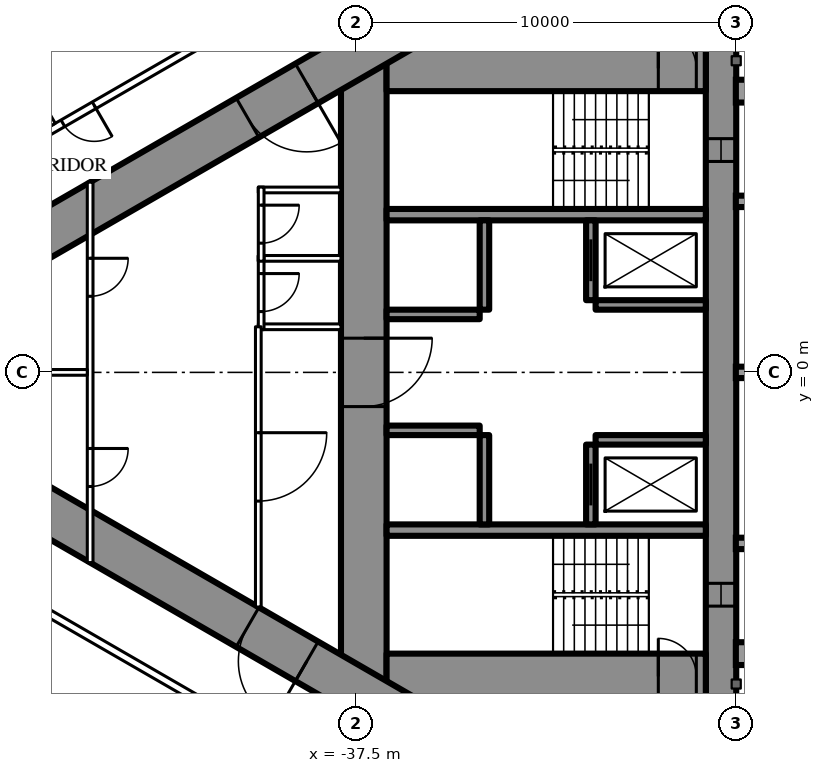
"""IFC4 building model, lengths in metres.
Left out: names, types, materials, properties, quantities, classifications, styles, units other than length and angle.
Written with IfcOpenShell. Run it as: python <this file> out.ifc"""

import sys

from ifc_helpers import new_model, si_unit, direction, frame, frame_2d, origin, place, context, subcontext, project, spatial, rectangle, extrude, element, fill, save


model = new_model("IFC4")
c1 = context("Model", 3, precision=1e-05, world=origin(), true_north=direction((0.0, 1.0)))
c2 = subcontext(c1, "Body", "Model", "MODEL_VIEW")
j1 = project(units=[si_unit("LENGTHUNIT", "METRE"), si_unit("PLANEANGLEUNIT", "RADIAN")], contexts=[c1])
p1 = place(None, origin())
s1 = spatial("IfcSite", under=j1, at=p1, CompositionType="ELEMENT")
p2 = place(p1, origin())
s2 = spatial("IfcBuilding", under=s1, at=p2, CompositionType="ELEMENT")
p3 = place(p2, frame((0.0, 0.0, 21.5)))
s3 = spatial("IfcBuildingStorey", under=s2, at=p3, CompositionType="ELEMENT", Elevation=21.5)
p4 = place(p3, frame((-27.9, 8.6, 0.0), z_axis=(0.0, 0.0, 1.0), x_axis=(0.0, -1.0, 0.0)))
e1 = element("IfcWall", 1, at=p4, inside=s3, PredefinedType="SHEAR", context=c2, shape_type="SweptSolid", body=[
    extrude(rectangle(XDim=17.2, YDim=0.8, at=frame_2d((8.6, 0.0))), origin(), (0.0, 0.0, 1.0), 3.5),
])
p5 = place(p4, frame((2.45, 0.0, 0.6)))
e2 = element("IfcOpeningElement", 2, at=p5, cuts=e1, PredefinedType="OPENING", context=c2, shape_type="SweptSolid", body=[
    extrude(rectangle(XDim=0.6, YDim=2.1, at=frame_2d((0.3, 1.05))), frame((0.0, 0.41, 0.0), z_axis=(0.0, -1.0, 0.0), x_axis=(1.0, 0.0, 0.0)), (0.0, 0.0, 1.0), 0.82),
])
p6 = place(p4, frame((14.15, 0.0, 0.6)))
e3 = element("IfcOpeningElement", 3, at=p6, cuts=e1, PredefinedType="OPENING", context=c2, shape_type="SweptSolid", body=[
    extrude(rectangle(XDim=0.6, YDim=2.1, at=frame_2d((0.3, 1.05))), frame((0.0, 0.41, 0.0), z_axis=(0.0, -1.0, 0.0), x_axis=(1.0, 0.0, 0.0)), (0.0, 0.0, 1.0), 0.82),
])
p7 = place(p3, frame((-37.3, 8.6, 0.0), z_axis=(0.0, 0.0, 1.0), x_axis=(0.0, -1.0, 0.0)))
e4 = element("IfcWall", 4, at=p7, inside=s3, PredefinedType="SHEAR", context=c2, shape_type="SweptSolid", body=[
    extrude(rectangle(XDim=17.2, YDim=1.2, at=frame_2d((8.6, 0.0))), origin(), (0.0, 0.0, 1.0), 3.5),
])
p8 = place(p7, frame((7.7, 0.0, 0.0)))
e5 = element("IfcOpeningElement", 5, at=p8, cuts=e4, PredefinedType="OPENING", context=c2, shape_type="SweptSolid", body=[
    extrude(rectangle(XDim=1.8, YDim=2.2, at=frame_2d((0.9, 1.1))), frame((0.0, 0.61, 0.0), z_axis=(0.0, -1.0, 0.0), x_axis=(1.0, 0.0, 0.0)), (0.0, 0.0, 1.0), 1.22),
])
p9 = place(p3, frame((-28.3, 8.0, 0.0), z_axis=(0.0, 0.0, 1.0), x_axis=(-1.0, 0.0, 0.0)))
e6 = element("IfcWall", 6, at=p9, inside=s3, PredefinedType="SHEAR", context=c2, shape_type="SweptSolid", body=[
    extrude(rectangle(XDim=8.4, YDim=1.2, at=frame_2d((4.2, 0.0))), origin(), (0.0, 0.0, 1.0), 3.5),
])
p10 = place(p9, frame((0.25, 0.0, 0.0)))
e7 = element("IfcOpeningElement", 7, at=p10, cuts=e6, PredefinedType="OPENING", context=c2, shape_type="SweptSolid", body=[
    extrude(rectangle(XDim=1.0, YDim=2.2, at=frame_2d((0.5, 1.1))), frame((0.0, 0.61, 0.0), z_axis=(0.0, -1.0, 0.0), x_axis=(1.0, 0.0, 0.0)), (0.0, 0.0, 1.0), 1.22),
])
p11 = place(p3, frame((-28.3, -8.0, 0.0), z_axis=(0.0, 0.0, 1.0), x_axis=(-1.0, 0.0, 0.0)))
e8 = element("IfcWall", 8, at=p11, inside=s3, PredefinedType="SHEAR", context=c2, shape_type="SweptSolid", body=[
    extrude(rectangle(XDim=8.4, YDim=1.2, at=frame_2d((4.2, 0.0))), origin(), (0.0, 0.0, 1.0), 3.5),
])
p12 = place(p11, frame((0.25, 0.0, 0.0)))
e9 = element("IfcOpeningElement", 9, at=p12, cuts=e8, PredefinedType="OPENING", context=c2, shape_type="SweptSolid", body=[
    extrude(rectangle(XDim=1.0, YDim=2.2, at=frame_2d((0.5, 1.1))), frame((0.0, 0.61, 0.0), z_axis=(0.0, -1.0, 0.0), x_axis=(1.0, 0.0, 0.0)), (0.0, 0.0, 1.0), 1.22),
])
for number, where, z_axis, x_axis in (
    (10, (-28.3, 4.15, 0.0), (0.0, 0.0, 1.0), (-1.0, 0.0, 0.0)),
    (11, (-28.3, -4.15, 0.0), (0.0, 0.0, 1.0), (-1.0, 0.0, 0.0)),
):
    element("IfcWall", number, at=place(p3, frame(where, z_axis=z_axis, x_axis=x_axis)), inside=s3, PredefinedType="SHEAR", context=c2, shape_type="SweptSolid", body=[
        extrude(rectangle(XDim=8.4, YDim=0.3, at=frame_2d((4.2, 0.0))), origin(), (0.0, 0.0, 1.0), 3.5),
    ])
p13 = place(p3, frame((-31.325, 4.0, 0.0), z_axis=(0.0, 0.0, 1.0), x_axis=(0.0, -1.0, 0.0)))
e12 = element("IfcWall", 12, at=p13, inside=s3, PredefinedType="SHEAR", context=c2, shape_type="SweptSolid", body=[
    extrude(rectangle(XDim=2.1, YDim=0.25, at=frame_2d((1.05, 0.0))), origin(), (0.0, 0.0, 1.0), 3.5),
])
p14 = place(p13, frame((0.5, 0.0, 0.0)))
e13 = element("IfcOpeningElement", 13, at=p14, cuts=e12, PredefinedType="OPENING", context=c2, shape_type="SweptSolid", body=[
    extrude(rectangle(XDim=1.1, YDim=2.2, at=frame_2d((0.55, 1.1))), frame((0.0, 0.135, 0.0), z_axis=(0.0, -1.0, 0.0), x_axis=(1.0, 0.0, 0.0)), (0.0, 0.0, 1.0), 0.27),
])
p15 = place(p3, frame((-34.125, 4.0, 0.0), z_axis=(0.0, 0.0, 1.0), x_axis=(0.0, -1.0, 0.0)))
e14 = element("IfcWall", 14, at=p15, inside=s3, PredefinedType="SHEAR", context=c2, shape_type="SweptSolid", body=[
    extrude(rectangle(XDim=2.35, YDim=0.25, at=frame_2d((1.175, 0.0))), origin(), (0.0, 0.0, 1.0), 3.5),
])
p16 = place(p3, frame((-28.3, 1.775, 0.0), z_axis=(0.0, 0.0, 1.0), x_axis=(-1.0, 0.0, 0.0)))
e15 = element("IfcWall", 15, at=p16, inside=s3, PredefinedType="SHEAR", context=c2, shape_type="SweptSolid", body=[
    extrude(rectangle(XDim=2.9, YDim=0.25, at=frame_2d((1.45, 0.0))), origin(), (0.0, 0.0, 1.0), 3.5),
])
p17 = place(p3, frame((-34.25, 1.525, 0.0), z_axis=(0.0, 0.0, 1.0), x_axis=(-1.0, 0.0, 0.0)))
e16 = element("IfcWall", 16, at=p17, inside=s3, PredefinedType="SHEAR", context=c2, shape_type="SweptSolid", body=[
    extrude(rectangle(XDim=2.45, YDim=0.25, at=frame_2d((1.225, 0.0))), origin(), (0.0, 0.0, 1.0), 3.5),
])
p18 = place(p3, frame((-31.325, -1.9, 0.0), z_axis=(0.0, 0.0, 1.0), x_axis=(0.0, -1.0, 0.0)))
e17 = element("IfcWall", 17, at=p18, inside=s3, PredefinedType="SHEAR", context=c2, shape_type="SweptSolid", body=[
    extrude(rectangle(XDim=2.1, YDim=0.25, at=frame_2d((1.05, 0.0))), origin(), (0.0, 0.0, 1.0), 3.5),
])
p19 = place(p18, frame((0.5, 0.0, 0.0)))
e18 = element("IfcOpeningElement", 18, at=p19, cuts=e17, PredefinedType="OPENING", context=c2, shape_type="SweptSolid", body=[
    extrude(rectangle(XDim=1.1, YDim=2.2, at=frame_2d((0.55, 1.1))), frame((0.0, 0.135, 0.0), z_axis=(0.0, -1.0, 0.0), x_axis=(1.0, 0.0, 0.0)), (0.0, 0.0, 1.0), 0.27),
])
p20 = place(p3, frame((-34.125, -1.65, 0.0), z_axis=(0.0, 0.0, 1.0), x_axis=(0.0, -1.0, 0.0)))
e19 = element("IfcWall", 19, at=p20, inside=s3, PredefinedType="SHEAR", context=c2, shape_type="SweptSolid", body=[
    extrude(rectangle(XDim=2.35, YDim=0.25, at=frame_2d((1.175, 0.0))), origin(), (0.0, 0.0, 1.0), 3.5),
])
p21 = place(p3, frame((-28.3, -1.775, 0.0), z_axis=(0.0, 0.0, 1.0), x_axis=(-1.0, 0.0, 0.0)))
e20 = element("IfcWall", 20, at=p21, inside=s3, PredefinedType="SHEAR", context=c2, shape_type="SweptSolid", body=[
    extrude(rectangle(XDim=2.9, YDim=0.25, at=frame_2d((1.45, 0.0))), origin(), (0.0, 0.0, 1.0), 3.5),
])
p22 = place(p3, frame((-34.25, -1.525, 0.0), z_axis=(0.0, 0.0, 1.0), x_axis=(-1.0, 0.0, 0.0)))
e21 = element("IfcWall", 21, at=p22, inside=s3, PredefinedType="SHEAR", context=c2, shape_type="SweptSolid", body=[
    extrude(rectangle(XDim=2.45, YDim=0.25, at=frame_2d((1.225, 0.0))), origin(), (0.0, 0.0, 1.0), 3.5),
])
p23 = place(p3, frame((-27.2, 14.3, 0.0), z_axis=(0.0, 0.0, 1.0), x_axis=(-0.866026593062, -0.499997940104, 0.0)))
e22 = element("IfcWall", 22, at=p23, inside=s3, PredefinedType="SHEAR", context=c2, shape_type="SweptSolid", body=[
    extrude(rectangle(XDim=28.946, YDim=1.2, at=frame_2d((14.473, 0.0))), origin(), (0.0, 0.0, 1.0), 3.5),
])
p24 = place(p23, frame((4.6, 0.0, 0.0)))
e23 = element("IfcOpeningElement", 23, at=p24, cuts=e22, PredefinedType="OPENING", context=c2, shape_type="SweptSolid", body=[
    extrude(rectangle(XDim=1.0, YDim=2.2, at=frame_2d((0.5, 1.1))), frame((0.0, 0.61, 0.0), z_axis=(0.0, -1.0, 0.0), x_axis=(1.0, 0.0, 0.0)), (0.0, 0.0, 1.0), 1.22),
])
p25 = place(p23, frame((13.395, 0.0, 0.0)))
e24 = element("IfcOpeningElement", 24, at=p25, cuts=e22, PredefinedType="OPENING", context=c2, shape_type="SweptSolid", body=[
    extrude(rectangle(XDim=1.8, YDim=2.2, at=frame_2d((0.9, 1.1))), frame((0.0, 0.61, 0.0), z_axis=(0.0, -1.0, 0.0), x_axis=(1.0, 0.0, 0.0)), (0.0, 0.0, 1.0), 1.22),
])
p26 = place(p3, frame((-27.2, -14.3, 0.0), z_axis=(0.0, 0.0, 1.0), x_axis=(-0.866024021859, 0.500002393557, 0.0)))
e25 = element("IfcWall", 25, at=p26, inside=s3, PredefinedType="SHEAR", context=c2, shape_type="SweptSolid", body=[
    extrude(rectangle(XDim=27.907, YDim=1.2, at=frame_2d((13.954, 0.0))), origin(), (0.0, 0.0, 1.0), 3.5),
])
p27 = place(p26, frame((4.6, 0.0, 0.0)))
e26 = element("IfcOpeningElement", 26, at=p27, cuts=e25, PredefinedType="OPENING", context=c2, shape_type="SweptSolid", body=[
    extrude(rectangle(XDim=1.0, YDim=2.2, at=frame_2d((0.5, 1.1))), frame((0.0, 0.61, 0.0), z_axis=(0.0, -1.0, 0.0), x_axis=(1.0, 0.0, 0.0)), (0.0, 0.0, 1.0), 1.22),
])
p28 = place(p26, frame((13.395, 0.0, 0.0)))
e27 = element("IfcOpeningElement", 27, at=p28, cuts=e25, PredefinedType="OPENING", context=c2, shape_type="SweptSolid", body=[
    extrude(rectangle(XDim=1.8, YDim=2.2, at=frame_2d((0.9, 1.1))), frame((0.0, 0.61, 0.0), z_axis=(0.0, -1.0, 0.0), x_axis=(1.0, 0.0, 0.0)), (0.0, 0.0, 1.0), 1.22),
])
p29 = place(p3, frame((-37.7, 10.894, 0.0), z_axis=(0.0, 0.0, 1.0), x_axis=(-0.866027905338, -0.499995667157, 0.0)))
e28 = element("IfcWall", 28, at=p29, inside=s3, PredefinedType="PARTITIONING", context=c2, shape_type="SweptSolid", body=[
    extrude(rectangle(XDim=21.787, YDim=0.2, at=frame_2d((10.894, 0.0))), origin(), (0.0, 0.0, 1.0), 3.25),
])
p30 = place(p29, frame((11.78, 0.0, 0.0)))
e29 = element("IfcOpeningElement", 29, at=p30, cuts=e28, PredefinedType="OPENING", context=c2, shape_type="SweptSolid", body=[
    extrude(rectangle(XDim=0.95, YDim=2.2, at=frame_2d((0.475, 1.1))), frame((0.0, 0.11, 0.0), z_axis=(0.0, -1.0, 0.0), x_axis=(1.0, 0.0, 0.0)), (0.0, 0.0, 1.0), 0.22),
])
p31 = place(p29, frame((7.73, 0.0, 0.0)))
e30 = element("IfcOpeningElement", 30, at=p31, cuts=e28, PredefinedType="OPENING", context=c2, shape_type="SweptSolid", body=[
    extrude(rectangle(XDim=0.95, YDim=2.2, at=frame_2d((0.475, 1.1))), frame((0.0, 0.11, 0.0), z_axis=(0.0, -1.0, 0.0), x_axis=(1.0, 0.0, 0.0)), (0.0, 0.0, 1.0), 0.22),
])
p32 = place(p3, frame((-36.92, -11.344, 0.0), z_axis=(0.0, 0.0, 1.0), x_axis=(-0.866028313256, 0.499994960614, 0.0)))
e31 = element("IfcWall", 31, at=p32, inside=s3, PredefinedType="PARTITIONING", context=c2, shape_type="SweptSolid", body=[
    extrude(rectangle(XDim=22.568, YDim=0.2, at=frame_2d((11.284, 0.0))), origin(), (0.0, 0.0, 1.0), 3.25),
])
p33 = place(p32, frame((15.03, 0.0, 0.0)))
e32 = element("IfcOpeningElement", 32, at=p33, cuts=e31, PredefinedType="OPENING", context=c2, shape_type="SweptSolid", body=[
    extrude(rectangle(XDim=0.95, YDim=2.2, at=frame_2d((0.475, 1.1))), frame((0.0, 0.11, 0.0), z_axis=(0.0, -1.0, 0.0), x_axis=(1.0, 0.0, 0.0)), (0.0, 0.0, 1.0), 0.22),
])
p34 = place(p32, frame((3.35, 0.0, 0.0)))
e33 = element("IfcOpeningElement", 33, at=p34, cuts=e31, PredefinedType="OPENING", context=c2, shape_type="SweptSolid", body=[
    extrude(rectangle(XDim=1.0, YDim=2.2, at=frame_2d((0.5, 1.1))), frame((0.0, 0.11, 0.0), z_axis=(0.0, -1.0, 0.0), x_axis=(1.0, 0.0, 0.0)), (0.0, 0.0, 1.0), 0.22),
])
p35 = place(p3, frame((-45.483, 6.515, 0.0), z_axis=(0.0, 0.0, 1.0), x_axis=(-0.500006934395, 0.866021400173, 0.0)))
e34 = element("IfcWall", 34, at=p35, inside=s3, PredefinedType="PARTITIONING", context=c2, shape_type="SweptSolid", body=[
    extrude(rectangle(XDim=2.6, YDim=0.15, at=frame_2d((1.3, 0.0))), origin(), (0.0, 0.0, 1.0), 3.25),
])
p36 = place(p35, frame((0.9, 0.0, 0.0)))
e35 = element("IfcOpeningElement", 35, at=p36, cuts=e34, PredefinedType="OPENING", context=c2, shape_type="SweptSolid", body=[
    extrude(rectangle(XDim=0.8, YDim=2.2, at=frame_2d((0.4, 1.1))), frame((0.0, 0.085, 0.0), z_axis=(0.0, -1.0, 0.0), x_axis=(1.0, 0.0, 0.0)), (0.0, 0.0, 1.0), 0.17),
])
for number, where, z_axis, x_axis in (
    (36, (-37.9, 1.2, 0.0), (0.0, 0.0, 1.0), (-1.0, 0.0, 0.0)),
    (37, (-37.9, 3.0, 0.0), (0.0, 0.0, 1.0), (-1.0, 0.0, 0.0)),
    (38, (-37.9, 4.8, 0.0), (0.0, 0.0, 1.0), (-1.0, 0.0, 0.0)),
):
    element("IfcWall", number, at=place(p3, frame(where, z_axis=z_axis, x_axis=x_axis)), inside=s3, PredefinedType="PARTITIONING", context=c2, shape_type="SweptSolid", body=[
        extrude(rectangle(XDim=2.175, YDim=0.15, at=frame_2d((1.087, 0.0))), origin(), (0.0, 0.0, 1.0), 3.25),
    ])
p37 = place(p3, frame((-40.0, 3.075, 0.0), z_axis=(0.0, 0.0, 1.0), x_axis=(0.0, -1.0, 0.0)))
e39 = element("IfcWall", 39, at=p37, inside=s3, PredefinedType="PARTITIONING", context=c2, shape_type="SweptSolid", body=[
    extrude(rectangle(XDim=1.95, YDim=0.15, at=frame_2d((0.975, 0.0))), origin(), (0.0, 0.0, 1.0), 3.25),
])
p38 = place(p37, frame((0.475, 0.0, 0.0)))
e40 = element("IfcOpeningElement", 40, at=p38, cuts=e39, PredefinedType="OPENING", context=c2, shape_type="SweptSolid", body=[
    extrude(rectangle(XDim=1.0, YDim=2.2, at=frame_2d((0.5, 1.1))), frame((0.0, 0.085, 0.0), z_axis=(0.0, -1.0, 0.0), x_axis=(1.0, 0.0, 0.0)), (0.0, 0.0, 1.0), 0.17),
])
p39 = place(p3, frame((-40.0, 4.875, 0.0), z_axis=(0.0, 0.0, 1.0), x_axis=(0.0, -1.0, 0.0)))
e41 = element("IfcWall", 41, at=p39, inside=s3, PredefinedType="PARTITIONING", context=c2, shape_type="SweptSolid", body=[
    extrude(rectangle(XDim=1.95, YDim=0.15, at=frame_2d((0.975, 0.0))), origin(), (0.0, 0.0, 1.0), 3.25),
])
p40 = place(p39, frame((0.475, 0.0, 0.0)))
e42 = element("IfcOpeningElement", 42, at=p40, cuts=e41, PredefinedType="OPENING", context=c2, shape_type="SweptSolid", body=[
    extrude(rectangle(XDim=1.0, YDim=2.2, at=frame_2d((0.5, 1.1))), frame((0.0, 0.085, 0.0), z_axis=(0.0, -1.0, 0.0), x_axis=(1.0, 0.0, 0.0)), (0.0, 0.0, 1.0), 0.17),
])
p41 = place(p3, frame((-40.075, 1.2, 0.0), z_axis=(0.0, 0.0, 1.0), x_axis=(0.0, -1.0, 0.0)))
e43 = element("IfcWall", 43, at=p41, inside=s3, PredefinedType="PARTITIONING", context=c2, shape_type="SweptSolid", body=[
    extrude(rectangle(XDim=7.374, YDim=0.15, at=frame_2d((3.687, 0.0))), origin(), (0.0, 0.0, 1.0), 3.25),
])
p42 = place(p41, frame((2.787, 0.0, 0.0)))
e44 = element("IfcOpeningElement", 44, at=p42, cuts=e43, PredefinedType="OPENING", context=c2, shape_type="SweptSolid", body=[
    extrude(rectangle(XDim=1.8, YDim=2.2, at=frame_2d((0.9, 1.1))), frame((0.0, 0.085, 0.0), z_axis=(0.0, -1.0, 0.0), x_axis=(1.0, 0.0, 0.0)), (0.0, 0.0, 1.0), 0.17),
])
p43 = place(p3, frame((-44.5, 5.005, 0.0), z_axis=(0.0, 0.0, 1.0), x_axis=(0.0, -1.0, 0.0)))
e45 = element("IfcWall", 45, at=p43, inside=s3, PredefinedType="PARTITIONING", context=c2, shape_type="SweptSolid", body=[
    extrude(rectangle(XDim=10.009, YDim=0.15, at=frame_2d((5.005, 0.0))), origin(), (0.0, 0.0, 1.0), 2.45),
])
p44 = place(p43, frame((2.002, 0.0, 0.0)))
e46 = element("IfcOpeningElement", 46, at=p44, cuts=e45, PredefinedType="OPENING", context=c2, shape_type="SweptSolid", body=[
    extrude(rectangle(XDim=1.0, YDim=2.2, at=frame_2d((0.5, 1.1))), frame((0.0, 0.085, 0.0), z_axis=(0.0, -1.0, 0.0), x_axis=(1.0, 0.0, 0.0)), (0.0, 0.0, 1.0), 0.17),
])
p45 = place(p43, frame((7.007, 0.0, 0.0)))
e47 = element("IfcOpeningElement", 47, at=p45, cuts=e45, PredefinedType="OPENING", context=c2, shape_type="SweptSolid", body=[
    extrude(rectangle(XDim=1.0, YDim=2.2, at=frame_2d((0.5, 1.1))), frame((0.0, 0.085, 0.0), z_axis=(0.0, -1.0, 0.0), x_axis=(1.0, 0.0, 0.0)), (0.0, 0.0, 1.0), 0.17),
])
p46 = place(p3, frame((-44.575, 0.0, 0.0), z_axis=(0.0, 0.0, 1.0), x_axis=(-1.0, 0.0, 0.0)))
e48 = element("IfcWall", 48, at=p46, inside=s3, PredefinedType="PARTITIONING", context=c2, shape_type="SweptSolid", body=[
    extrude(rectangle(XDim=8.593, YDim=0.15, at=frame_2d((4.297, 0.0))), origin(), (0.0, 0.0, 1.0), 2.25),
])
p47 = place(p31, origin())
e49 = element("IfcDoor", 49, at=p47, inside=s3, OperationType="SINGLE_SWING_LEFT", PredefinedType="DOOR", context=c2, shape_type="SweptSolid", body=[
    extrude(rectangle(XDim=0.95, YDim=2.2, at=frame_2d((0.475, 1.1))), frame((0.0, 0.025, 0.0), z_axis=(0.0, -1.0, 0.0), x_axis=(1.0, 0.0, 0.0)), (0.0, 0.0, 1.0), 0.05),
])
fill(e30, e49)
p48 = place(p38, origin())
e50 = element("IfcDoor", 50, at=p48, inside=s3, OperationType="SINGLE_SWING_LEFT", PredefinedType="DOOR", context=c2, shape_type="SweptSolid", body=[
    extrude(rectangle(XDim=1.0, YDim=2.2, at=frame_2d((0.5, 1.1))), frame((0.0, 0.025, 0.0), z_axis=(0.0, -1.0, 0.0), x_axis=(1.0, 0.0, 0.0)), (0.0, 0.0, 1.0), 0.05),
])
fill(e40, e50)
p49 = place(p40, origin())
e51 = element("IfcDoor", 51, at=p49, inside=s3, OperationType="SINGLE_SWING_LEFT", PredefinedType="DOOR", context=c2, shape_type="SweptSolid", body=[
    extrude(rectangle(XDim=1.0, YDim=2.2, at=frame_2d((0.5, 1.1))), frame((0.0, 0.025, 0.0), z_axis=(0.0, -1.0, 0.0), x_axis=(1.0, 0.0, 0.0)), (0.0, 0.0, 1.0), 0.05),
])
fill(e42, e51)
p50 = place(p42, origin())
e52 = element("IfcDoor", 52, at=p50, inside=s3, OperationType="DOUBLE_DOOR_SINGLE_SWING", PredefinedType="DOOR", context=c2, shape_type="SweptSolid", body=[
    extrude(rectangle(XDim=1.8, YDim=2.2, at=frame_2d((0.9, 1.1))), frame((0.0, 0.025, 0.0), z_axis=(0.0, -1.0, 0.0), x_axis=(1.0, 0.0, 0.0)), (0.0, 0.0, 1.0), 0.05),
])
fill(e44, e52)
p51 = place(p44, origin())
e53 = element("IfcDoor", 53, at=p51, inside=s3, OperationType="SINGLE_SWING_LEFT", PredefinedType="DOOR", context=c2, shape_type="SweptSolid", body=[
    extrude(rectangle(XDim=1.0, YDim=2.2, at=frame_2d((0.5, 1.1))), frame((0.0, 0.025, 0.0), z_axis=(0.0, -1.0, 0.0), x_axis=(1.0, 0.0, 0.0)), (0.0, 0.0, 1.0), 0.05),
])
fill(e46, e53)
p52 = place(p45, origin())
e54 = element("IfcDoor", 54, at=p52, inside=s3, OperationType="SINGLE_SWING_LEFT", PredefinedType="DOOR", context=c2, shape_type="SweptSolid", body=[
    extrude(rectangle(XDim=1.0, YDim=2.2, at=frame_2d((0.5, 1.1))), frame((0.0, 0.025, 0.0), z_axis=(0.0, -1.0, 0.0), x_axis=(1.0, 0.0, 0.0)), (0.0, 0.0, 1.0), 0.05),
])
fill(e47, e54)
p53 = place(p25, origin())
e55 = element("IfcDoor", 55, at=p53, inside=s3, OperationType="DOUBLE_DOOR_SINGLE_SWING", PredefinedType="DOOR", context=c2, shape_type="SweptSolid", body=[
    extrude(rectangle(XDim=1.8, YDim=2.2, at=frame_2d((0.9, 1.1))), frame((0.0, 0.025, 0.0), z_axis=(0.0, -1.0, 0.0), x_axis=(1.0, 0.0, 0.0)), (0.0, 0.0, 1.0), 0.05),
])
fill(e24, e55)
p54 = place(p28, origin())
e56 = element("IfcDoor", 56, at=p54, inside=s3, OperationType="DOUBLE_DOOR_SINGLE_SWING", PredefinedType="DOOR", context=c2, shape_type="SweptSolid", body=[
    extrude(rectangle(XDim=1.8, YDim=2.2, at=frame_2d((0.9, 1.1))), frame((0.0, 0.025, 0.0), z_axis=(0.0, -1.0, 0.0), x_axis=(1.0, 0.0, 0.0)), (0.0, 0.0, 1.0), 0.05),
])
fill(e27, e56)
p55 = place(p8, origin())
e57 = element("IfcDoor", 57, at=p55, inside=s3, OperationType="DOUBLE_DOOR_SINGLE_SWING", PredefinedType="DOOR", context=c2, shape_type="SweptSolid", body=[
    extrude(rectangle(XDim=1.8, YDim=2.2, at=frame_2d((0.9, 1.1))), frame((0.0, 0.025, 0.0), z_axis=(0.0, -1.0, 0.0), x_axis=(1.0, 0.0, 0.0)), (0.0, 0.0, 1.0), 0.05),
])
fill(e5, e57)
p56 = place(p10, origin())
e58 = element("IfcDoor", 58, at=p56, inside=s3, OperationType="SINGLE_SWING_RIGHT", PredefinedType="DOOR", context=c2, shape_type="SweptSolid", body=[
    extrude(rectangle(XDim=1.0, YDim=2.2, at=frame_2d((0.5, 1.1))), frame((0.0, 0.025, 0.0), z_axis=(0.0, -1.0, 0.0), x_axis=(1.0, 0.0, 0.0)), (0.0, 0.0, 1.0), 0.05),
])
fill(e7, e58)
p57 = place(p12, origin())
e59 = element("IfcDoor", 59, at=p57, inside=s3, OperationType="SINGLE_SWING_RIGHT", PredefinedType="DOOR", context=c2, shape_type="SweptSolid", body=[
    extrude(rectangle(XDim=1.0, YDim=2.2, at=frame_2d((0.5, 1.1))), frame((0.0, 0.025, 0.0), z_axis=(0.0, -1.0, 0.0), x_axis=(1.0, 0.0, 0.0)), (0.0, 0.0, 1.0), 0.05),
])
fill(e9, e59)
p58 = place(p14, origin())
e60 = element("IfcDoor", 60, at=p58, inside=s3, OperationType="SLIDING_TO_LEFT", PredefinedType="USERDEFINED", context=c2, shape_type="SweptSolid", body=[
    extrude(rectangle(XDim=1.1, YDim=2.2, at=frame_2d((0.55, 1.1))), frame((0.0, 0.025, 0.0), z_axis=(0.0, -1.0, 0.0), x_axis=(1.0, 0.0, 0.0)), (0.0, 0.0, 1.0), 0.05),
])
fill(e13, e60)
p59 = place(p19, origin())
e61 = element("IfcDoor", 61, at=p59, inside=s3, OperationType="SLIDING_TO_LEFT", PredefinedType="USERDEFINED", context=c2, shape_type="SweptSolid", body=[
    extrude(rectangle(XDim=1.1, YDim=2.2, at=frame_2d((0.55, 1.1))), frame((0.0, 0.025, 0.0), z_axis=(0.0, -1.0, 0.0), x_axis=(1.0, 0.0, 0.0)), (0.0, 0.0, 1.0), 0.05),
])
fill(e18, e61)
p60 = place(p5, origin())
e62 = element("IfcWindow", 62, at=p60, inside=s3, PartitioningType="SINGLE_PANEL", PredefinedType="WINDOW", context=c2, shape_type="SweptSolid", body=[
    extrude(rectangle(XDim=0.6, YDim=2.1, at=frame_2d((0.3, 1.05))), frame((0.0, 0.03, 0.0), z_axis=(0.0, -1.0, 0.0), x_axis=(1.0, 0.0, 0.0)), (0.0, 0.0, 1.0), 0.06),
])
fill(e2, e62)
p61 = place(p6, origin())
e63 = element("IfcWindow", 63, at=p61, inside=s3, PartitioningType="SINGLE_PANEL", PredefinedType="WINDOW", context=c2, shape_type="SweptSolid", body=[
    extrude(rectangle(XDim=0.6, YDim=2.1, at=frame_2d((0.3, 1.05))), frame((0.0, 0.03, 0.0), z_axis=(0.0, -1.0, 0.0), x_axis=(1.0, 0.0, 0.0)), (0.0, 0.0, 1.0), 0.06),
])
fill(e3, e63)
save(model, sys.argv[1])
